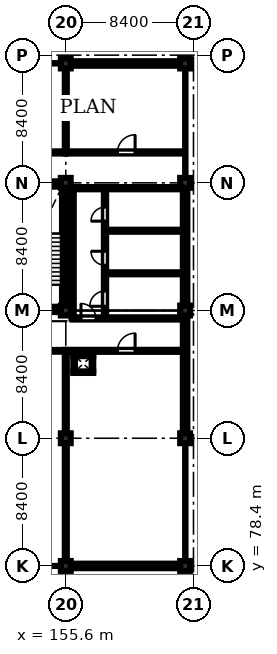
"""IFC4 building model, lengths in metres.
Left out: names, types, materials, properties, quantities, classifications, styles, units other than length and angle.
Written with IfcOpenShell. Run it as: python <this file> out.ifc"""

import sys

from ifc_helpers import new_model, si_unit, direction, frame, frame_2d, origin, origin_2d, place, context, subcontext, project, spatial, rectangle, extrude, element, fill, save


model = new_model("IFC4")
c1 = context("Model", 3, precision=1e-05, world=origin(), true_north=direction((0.0, 1.0)))
c2 = subcontext(c1, "Body", "Model", "MODEL_VIEW")
j1 = project(units=[si_unit("LENGTHUNIT", "METRE"), si_unit("PLANEANGLEUNIT", "RADIAN")], contexts=[c1])
p1 = place(None, origin())
s1 = spatial("IfcSite", under=j1, at=p1, CompositionType="ELEMENT")
p2 = place(p1, origin())
s2 = spatial("IfcBuilding", under=s1, at=p2, CompositionType="ELEMENT")
p3 = place(p2, frame((0.0, 0.0, 57.0)))
s3 = spatial("IfcBuildingStorey", under=s2, at=p3, CompositionType="ELEMENT", Elevation=57.0)
for number, where, z_axis, x_axis in (
    (1, (155.6, 78.4, 0.0), (0.0, 0.0, 1.0), (1.0, 0.0, 0.0)),
    (2, (155.6, 86.8, 0.0), (0.0, 0.0, 1.0), (1.0, 0.0, 0.0)),
    (3, (155.6, 95.2, 0.0), (0.0, 0.0, 1.0), (1.0, 0.0, 0.0)),
    (4, (155.6, 103.6, 0.0), (0.0, 0.0, 1.0), (1.0, 0.0, 0.0)),
    (5, (155.6, 111.45, 0.0), (0.0, 0.0, 1.0), (1.0, 0.0, 0.0)),
    (6, (163.45, 78.4, 0.0), (0.0, 0.0, 1.0), (1.0, 0.0, 0.0)),
    (7, (163.45, 86.8, 0.0), (0.0, 0.0, 1.0), (1.0, 0.0, 0.0)),
    (8, (163.45, 95.2, 0.0), (0.0, 0.0, 1.0), (1.0, 0.0, 0.0)),
    (9, (163.45, 103.6, 0.0), (0.0, 0.0, 1.0), (1.0, 0.0, 0.0)),
    (10, (163.45, 111.45, 0.0), (0.0, 0.0, 1.0), (1.0, 0.0, 0.0)),
):
    element("IfcColumn", number, at=place(p3, frame(where, z_axis=z_axis, x_axis=x_axis)), inside=s3, PredefinedType="COLUMN", context=c2, shape_type="SweptSolid", body=[
        extrude(rectangle(XDim=0.65, YDim=0.65, at=origin_2d()), origin(), (0.0, 0.0, 1.0), 4.02),
    ])
for number, where, z_axis, x_axis in (
    (11, (151.9, 95.275, 0.0), (0.0, 0.0, 1.0), (1.0, 0.0, 0.0)),
    (12, (151.9, 103.525, 0.0), (0.0, 0.0, 1.0), (1.0, 0.0, 0.0)),
):
    element("IfcWall", number, at=place(p3, frame(where, z_axis=z_axis, x_axis=x_axis)), inside=s3, PredefinedType="SHEAR", context=c2, shape_type="SweptSolid", body=[
        extrude(rectangle(XDim=3.8, YDim=0.35, at=frame_2d((1.9, 0.0))), origin(), (0.0, 0.0, 1.0), 4.02),
    ])
p4 = place(p3, frame((155.525, 95.45, 0.0), z_axis=(0.0, 0.0, 1.0), x_axis=(0.0, 1.0, 0.0)))
e13 = element("IfcWall", 13, at=p4, inside=s3, PredefinedType="SHEAR", context=c2, shape_type="SweptSolid", body=[
    extrude(rectangle(XDim=7.9, YDim=0.35, at=frame_2d((3.95, 0.0))), origin(), (0.0, 0.0, 1.0), 4.02),
])
p5 = place(p3, frame((155.925, 111.45, 0.0), z_axis=(0.0, 0.0, 1.0), x_axis=(1.0, 0.0, 0.0)))
e14 = element("IfcWall", 14, at=p5, inside=s3, PredefinedType="STANDARD", context=c2, shape_type="SweptSolid", body=[
    extrude(rectangle(XDim=7.2, YDim=0.3, at=frame_2d((3.6, 0.0))), origin(), (0.0, 0.0, 1.0), 3.32),
])
p6 = place(p5, frame((0.85, 0.0, 0.9)))
e15 = element("IfcOpeningElement", 15, at=p6, cuts=e14, PredefinedType="OPENING", context=c2, shape_type="SweptSolid", body=[
    extrude(rectangle(XDim=1.9, YDim=2.1, at=frame_2d((0.95, 1.05))), frame((0.0, 0.16, 0.0), z_axis=(0.0, -1.0, 0.0), x_axis=(1.0, 0.0, 0.0)), (0.0, 0.0, 1.0), 0.32),
])
p7 = place(p5, frame((4.65, 0.0, 0.9)))
e16 = element("IfcOpeningElement", 16, at=p7, cuts=e14, PredefinedType="OPENING", context=c2, shape_type="SweptSolid", body=[
    extrude(rectangle(XDim=1.9, YDim=2.1, at=frame_2d((0.95, 1.05))), frame((0.0, 0.16, 0.0), z_axis=(0.0, -1.0, 0.0), x_axis=(1.0, 0.0, 0.0)), (0.0, 0.0, 1.0), 0.32),
])
p8 = place(p3, frame((163.125, 78.4, 0.0), z_axis=(0.0, 0.0, 1.0), x_axis=(-1.0, 0.0, 0.0)))
e17 = element("IfcWall", 17, at=p8, inside=s3, PredefinedType="STANDARD", context=c2, shape_type="SweptSolid", body=[
    extrude(rectangle(XDim=7.2, YDim=0.3, at=frame_2d((3.6, 0.0))), origin(), (0.0, 0.0, 1.0), 3.32),
])
p9 = place(p8, frame((1.15, 0.0, 0.95)))
e18 = element("IfcOpeningElement", 18, at=p9, cuts=e17, PredefinedType="OPENING", context=c2, shape_type="SweptSolid", body=[
    extrude(rectangle(XDim=1.75, YDim=1.85, at=frame_2d((0.875, 0.925))), frame((0.0, 0.16, 0.0), z_axis=(0.0, -1.0, 0.0), x_axis=(1.0, 0.0, 0.0)), (0.0, 0.0, 1.0), 0.32),
])
p10 = place(p3, frame((163.45, 94.875, 0.0), z_axis=(0.0, 0.0, 1.0), x_axis=(0.0, -1.0, 0.0)))
e19 = element("IfcWall", 19, at=p10, inside=s3, PredefinedType="STANDARD", context=c2, shape_type="SweptSolid", body=[
    extrude(rectangle(XDim=7.75, YDim=0.3, at=frame_2d((3.875, 0.0))), origin(), (0.0, 0.0, 1.0), 3.32),
])
p11 = place(p10, frame((4.2, 0.0, 1.1)))
e20 = element("IfcOpeningElement", 20, at=p11, cuts=e19, PredefinedType="OPENING", context=c2, shape_type="SweptSolid", body=[
    extrude(rectangle(XDim=1.8, YDim=1.8, at=frame_2d((0.9, 0.9))), frame((0.0, 0.16, 0.0), z_axis=(0.0, -1.0, 0.0), x_axis=(1.0, 0.0, 0.0)), (0.0, 0.0, 1.0), 0.32),
])
p12 = place(p3, frame((163.45, 103.275, 0.0), z_axis=(0.0, 0.0, 1.0), x_axis=(0.0, -1.0, 0.0)))
e21 = element("IfcWall", 21, at=p12, inside=s3, PredefinedType="STANDARD", context=c2, shape_type="SweptSolid", body=[
    extrude(rectangle(XDim=7.75, YDim=0.3, at=frame_2d((3.875, 0.0))), origin(), (0.0, 0.0, 1.0), 3.32),
])
p13 = place(p12, frame((1.15, 0.0, 1.1)))
e22 = element("IfcOpeningElement", 22, at=p13, cuts=e21, PredefinedType="OPENING", context=c2, shape_type="SweptSolid", body=[
    extrude(rectangle(XDim=1.4, YDim=1.4, at=frame_2d((0.7, 0.7))), frame((0.0, 0.16, 0.0), z_axis=(0.0, -1.0, 0.0), x_axis=(1.0, 0.0, 0.0)), (0.0, 0.0, 1.0), 0.32),
])
p14 = place(p3, frame((156.05, 94.68, 0.0), z_axis=(0.0, 0.0, 1.0), x_axis=(1.0, 0.0, 0.0)))
e23 = element("IfcWall", 23, at=p14, inside=s3, PredefinedType="PARTITIONING", context=c2, shape_type="SweptSolid", body=[
    extrude(rectangle(XDim=7.15, YDim=0.15, at=frame_2d((3.575, 0.0))), origin(), (0.0, 0.0, 1.0), 4.02),
])
p15 = place(p14, frame((0.55, 0.0, 0.0)))
e24 = element("IfcOpeningElement", 24, at=p15, cuts=e23, PredefinedType="OPENING", context=c2, shape_type="SweptSolid", body=[
    extrude(rectangle(XDim=0.98, YDim=2.12, at=frame_2d((0.49, 1.06))), frame((0.0, 0.085, 0.0), z_axis=(0.0, -1.0, 0.0), x_axis=(1.0, 0.0, 0.0)), (0.0, 0.0, 1.0), 0.17),
])
p16 = place(p3, frame((158.18, 94.68, 0.0), z_axis=(0.0, 0.0, 1.0), x_axis=(0.0, 1.0, 0.0)))
e25 = element("IfcWall", 25, at=p16, inside=s3, PredefinedType="PARTITIONING", context=c2, shape_type="SweptSolid", body=[
    extrude(rectangle(XDim=8.57, YDim=0.15, at=frame_2d((4.285, 0.0))), origin(), (0.0, 0.0, 1.0), 4.02),
])
p17 = place(p16, frame((0.8, 0.0, 0.0)))
e26 = element("IfcOpeningElement", 26, at=p17, cuts=e25, PredefinedType="OPENING", context=c2, shape_type="SweptSolid", body=[
    extrude(rectangle(XDim=1.0, YDim=2.12, at=frame_2d((0.5, 1.06))), frame((0.0, 0.085, 0.0), z_axis=(0.0, -1.0, 0.0), x_axis=(1.0, 0.0, 0.0)), (0.0, 0.0, 1.0), 0.17),
])
p18 = place(p16, frame((3.5, 0.0, 0.0)))
e27 = element("IfcOpeningElement", 27, at=p18, cuts=e25, PredefinedType="OPENING", context=c2, shape_type="SweptSolid", body=[
    extrude(rectangle(XDim=0.92, YDim=2.1, at=frame_2d((0.46, 1.05))), frame((0.0, 0.085, 0.0), z_axis=(0.0, -1.0, 0.0), x_axis=(1.0, 0.0, 0.0)), (0.0, 0.0, 1.0), 0.17),
])
p19 = place(p16, frame((6.4, 0.0, 0.0)))
e28 = element("IfcOpeningElement", 28, at=p19, cuts=e25, PredefinedType="OPENING", context=c2, shape_type="SweptSolid", body=[
    extrude(rectangle(XDim=0.92, YDim=2.1, at=frame_2d((0.46, 1.05))), frame((0.0, 0.085, 0.0), z_axis=(0.0, -1.0, 0.0), x_axis=(1.0, 0.0, 0.0)), (0.0, 0.0, 1.0), 0.17),
])
for number, where, z_axis, x_axis in (
    (29, (158.18, 97.65, 0.0), (0.0, 0.0, 1.0), (1.0, 0.0, 0.0)),
    (30, (158.18, 100.45, 0.0), (0.0, 0.0, 1.0), (1.0, 0.0, 0.0)),
):
    element("IfcWall", number, at=place(p3, frame(where, z_axis=z_axis, x_axis=x_axis)), inside=s3, PredefinedType="PARTITIONING", context=c2, shape_type="SweptSolid", body=[
        extrude(rectangle(XDim=5.02, YDim=0.135, at=frame_2d((2.51, 0.0))), origin(), (0.0, 0.0, 1.0), 4.02),
    ])
p20 = place(p3, frame((156.05, 103.25, 0.0), z_axis=(0.0, 0.0, 1.0), x_axis=(1.0, 0.0, 0.0)))
e31 = element("IfcWall", 31, at=p20, inside=s3, PredefinedType="PARTITIONING", context=c2, shape_type="SweptSolid", body=[
    extrude(rectangle(XDim=7.15, YDim=0.15, at=frame_2d((3.575, 0.0))), origin(), (0.0, 0.0, 1.0), 4.02),
])
p21 = place(p3, frame((156.05, 94.68, 0.0), z_axis=(0.0, 0.0, 1.0), x_axis=(0.0, 1.0, 0.0)))
e32 = element("IfcWall", 32, at=p21, inside=s3, PredefinedType="PARTITIONING", context=c2, shape_type="SweptSolid", body=[
    extrude(rectangle(XDim=8.57, YDim=0.15, at=frame_2d((4.285, 0.0))), origin(), (0.0, 0.0, 1.0), 4.02),
])
p22 = place(p3, frame((147.2, 105.6, 0.0), z_axis=(0.0, 0.0, 1.0), x_axis=(1.0, 0.0, 0.0)))
e33 = element("IfcWall", 33, at=p22, inside=s3, PredefinedType="PARTITIONING", context=c2, shape_type="SweptSolid", body=[
    extrude(rectangle(XDim=8.4, YDim=0.145, at=frame_2d((4.2, 0.0))), origin(), (0.0, 0.0, 1.0), 4.02),
])
p23 = place(p22, frame((3.4, 0.0, 0.0)))
e34 = element("IfcOpeningElement", 34, at=p23, cuts=e33, PredefinedType="OPENING", context=c2, shape_type="SweptSolid", body=[
    extrude(rectangle(XDim=1.04, YDim=2.16, at=frame_2d((0.52, 1.08))), frame((0.0, 0.083, 0.0), z_axis=(0.0, -1.0, 0.0), x_axis=(1.0, 0.0, 0.0)), (0.0, 0.0, 1.0), 0.165),
])
p24 = place(p3, frame((155.6, 105.6, 0.0), z_axis=(0.0, 0.0, 1.0), x_axis=(1.0, 0.0, 0.0)))
e35 = element("IfcWall", 35, at=p24, inside=s3, PredefinedType="PARTITIONING", context=c2, shape_type="SweptSolid", body=[
    extrude(rectangle(XDim=7.75, YDim=0.145, at=frame_2d((3.875, 0.0))), origin(), (0.0, 0.0, 1.0), 4.02),
])
p25 = place(p24, frame((3.4, 0.0, 0.0)))
e36 = element("IfcOpeningElement", 36, at=p25, cuts=e35, PredefinedType="OPENING", context=c2, shape_type="SweptSolid", body=[
    extrude(rectangle(XDim=1.16, YDim=2.2, at=frame_2d((0.58, 1.1))), frame((0.0, 0.083, 0.0), z_axis=(0.0, -1.0, 0.0), x_axis=(1.0, 0.0, 0.0)), (0.0, 0.0, 1.0), 0.165),
])
p26 = place(p3, frame((155.6, 105.6, 0.0), z_axis=(0.0, 0.0, 1.0), x_axis=(0.0, 1.0, 0.0)))
e37 = element("IfcWall", 37, at=p26, inside=s3, PredefinedType="PARTITIONING", context=c2, shape_type="SweptSolid", body=[
    extrude(rectangle(XDim=5.75, YDim=0.135, at=frame_2d((2.875, 0.0))), origin(), (0.0, 0.0, 1.0), 3.32),
])
p27 = place(p3, frame((147.2, 92.55, 0.0), z_axis=(0.0, 0.0, 1.0), x_axis=(1.0, 0.0, 0.0)))
e38 = element("IfcWall", 38, at=p27, inside=s3, PredefinedType="PARTITIONING", context=c2, shape_type="SweptSolid", body=[
    extrude(rectangle(XDim=8.4, YDim=0.12, at=frame_2d((4.2, 0.0))), origin(), (0.0, 0.0, 1.0), 4.02),
])
p28 = place(p27, frame((3.4, 0.0, 0.0)))
e39 = element("IfcOpeningElement", 39, at=p28, cuts=e38, PredefinedType="OPENING", context=c2, shape_type="SweptSolid", body=[
    extrude(rectangle(XDim=1.16, YDim=2.2, at=frame_2d((0.58, 1.1))), frame((0.0, 0.07, 0.0), z_axis=(0.0, -1.0, 0.0), x_axis=(1.0, 0.0, 0.0)), (0.0, 0.0, 1.0), 0.14),
])
p29 = place(p3, frame((155.6, 92.55, 0.0), z_axis=(0.0, 0.0, 1.0), x_axis=(1.0, 0.0, 0.0)))
e40 = element("IfcWall", 40, at=p29, inside=s3, PredefinedType="PARTITIONING", context=c2, shape_type="SweptSolid", body=[
    extrude(rectangle(XDim=7.75, YDim=0.135, at=frame_2d((3.875, 0.0))), origin(), (0.0, 0.0, 1.0), 4.02),
])
p30 = place(p29, frame((3.4, 0.0, 0.0)))
e41 = element("IfcOpeningElement", 41, at=p30, cuts=e40, PredefinedType="OPENING", context=c2, shape_type="SweptSolid", body=[
    extrude(rectangle(XDim=1.16, YDim=2.2, at=frame_2d((0.58, 1.1))), frame((0.0, 0.077, 0.0), z_axis=(0.0, -1.0, 0.0), x_axis=(1.0, 0.0, 0.0)), (0.0, 0.0, 1.0), 0.155),
])
p31 = place(p3, frame((155.6, 78.55, 0.0), z_axis=(0.0, 0.0, 1.0), x_axis=(0.0, 1.0, 0.0)))
e42 = element("IfcWall", 42, at=p31, inside=s3, PredefinedType="PARTITIONING", context=c2, shape_type="SweptSolid", body=[
    extrude(rectangle(XDim=14.0, YDim=0.135, at=frame_2d((7.0, 0.0))), origin(), (0.0, 0.0, 1.0), 3.32),
])
for number, where, z_axis, x_axis in (
    (43, (156.095, 91.147, 0.0), (0.0, 0.0, 1.0), (1.0, 0.0, 0.0)),
    (44, (156.095, 92.252, 0.0), (0.0, 0.0, 1.0), (1.0, 0.0, 0.0)),
):
    element("IfcWall", number, at=place(p3, frame(where, z_axis=z_axis, x_axis=x_axis)), inside=s3, PredefinedType="PARTITIONING", context=c2, shape_type="SweptSolid", body=[
        extrude(rectangle(XDim=1.31, YDim=0.105, at=frame_2d((0.655, 0.0))), origin(), (0.0, 0.0, 1.0), 4.02),
    ])
for number, where, z_axis, x_axis in (
    (45, (156.147, 91.2, 0.0), (0.0, 0.0, 1.0), (0.0, 1.0, 0.0)),
    (46, (157.353, 91.2, 0.0), (0.0, 0.0, 1.0), (0.0, 1.0, 0.0)),
):
    element("IfcWall", number, at=place(p3, frame(where, z_axis=z_axis, x_axis=x_axis)), inside=s3, PredefinedType="PARTITIONING", context=c2, shape_type="SweptSolid", body=[
        extrude(rectangle(XDim=1.0, YDim=0.105, at=frame_2d((0.5, 0.0))), origin(), (0.0, 0.0, 1.0), 4.02),
    ])
p32 = place(p6, origin())
e47 = element("IfcWindow", 47, at=p32, inside=s3, PartitioningType="DOUBLE_PANEL_VERTICAL", PredefinedType="WINDOW", context=c2, shape_type="SweptSolid", body=[
    extrude(rectangle(XDim=1.9, YDim=2.1, at=frame_2d((0.95, 1.05))), frame((0.0, 0.03, 0.0), z_axis=(0.0, -1.0, 0.0), x_axis=(1.0, 0.0, 0.0)), (0.0, 0.0, 1.0), 0.06),
])
fill(e15, e47)
p33 = place(p7, origin())
e48 = element("IfcWindow", 48, at=p33, inside=s3, PartitioningType="DOUBLE_PANEL_VERTICAL", PredefinedType="WINDOW", context=c2, shape_type="SweptSolid", body=[
    extrude(rectangle(XDim=1.9, YDim=2.1, at=frame_2d((0.95, 1.05))), frame((0.0, 0.03, 0.0), z_axis=(0.0, -1.0, 0.0), x_axis=(1.0, 0.0, 0.0)), (0.0, 0.0, 1.0), 0.06),
])
fill(e16, e48)
p34 = place(p9, origin())
e49 = element("IfcWindow", 49, at=p34, inside=s3, PartitioningType="DOUBLE_PANEL_VERTICAL", PredefinedType="WINDOW", context=c2, shape_type="SweptSolid", body=[
    extrude(rectangle(XDim=1.75, YDim=1.85, at=frame_2d((0.875, 0.925))), frame((0.0, 0.03, 0.0), z_axis=(0.0, -1.0, 0.0), x_axis=(1.0, 0.0, 0.0)), (0.0, 0.0, 1.0), 0.06),
])
fill(e18, e49)
p35 = place(p11, origin())
e50 = element("IfcWindow", 50, at=p35, inside=s3, PartitioningType="DOUBLE_PANEL_VERTICAL", PredefinedType="WINDOW", context=c2, shape_type="SweptSolid", body=[
    extrude(rectangle(XDim=1.8, YDim=1.8, at=frame_2d((0.9, 0.9))), frame((0.0, 0.03, 0.0), z_axis=(0.0, -1.0, 0.0), x_axis=(1.0, 0.0, 0.0)), (0.0, 0.0, 1.0), 0.06),
])
fill(e20, e50)
p36 = place(p13, origin())
e51 = element("IfcWindow", 51, at=p36, inside=s3, PartitioningType="SINGLE_PANEL", PredefinedType="WINDOW", context=c2, shape_type="SweptSolid", body=[
    extrude(rectangle(XDim=1.4, YDim=1.4, at=frame_2d((0.7, 0.7))), frame((0.0, 0.03, 0.0), z_axis=(0.0, -1.0, 0.0), x_axis=(1.0, 0.0, 0.0)), (0.0, 0.0, 1.0), 0.06),
])
fill(e22, e51)
p37 = place(p15, origin())
e52 = element("IfcDoor", 52, at=p37, inside=s3, OperationType="SINGLE_SWING_LEFT", PredefinedType="DOOR", context=c2, shape_type="SweptSolid", body=[
    extrude(rectangle(XDim=0.98, YDim=2.12, at=frame_2d((0.49, 1.06))), frame((0.0, 0.025, 0.0), z_axis=(0.0, -1.0, 0.0), x_axis=(1.0, 0.0, 0.0)), (0.0, 0.0, 1.0), 0.05),
])
fill(e24, e52)
p38 = place(p17, origin())
e53 = element("IfcDoor", 53, at=p38, inside=s3, OperationType="SINGLE_SWING_LEFT", PredefinedType="DOOR", context=c2, shape_type="SweptSolid", body=[
    extrude(rectangle(XDim=1.0, YDim=2.12, at=frame_2d((0.5, 1.06))), frame((0.0, 0.025, 0.0), z_axis=(0.0, -1.0, 0.0), x_axis=(1.0, 0.0, 0.0)), (0.0, 0.0, 1.0), 0.05),
])
fill(e26, e53)
p39 = place(p18, origin())
e54 = element("IfcDoor", 54, at=p39, inside=s3, OperationType="SINGLE_SWING_RIGHT", PredefinedType="DOOR", context=c2, shape_type="SweptSolid", body=[
    extrude(rectangle(XDim=0.92, YDim=2.1, at=frame_2d((0.46, 1.05))), frame((0.0, 0.025, 0.0), z_axis=(0.0, -1.0, 0.0), x_axis=(1.0, 0.0, 0.0)), (0.0, 0.0, 1.0), 0.05),
])
fill(e27, e54)
p40 = place(p19, origin())
e55 = element("IfcDoor", 55, at=p40, inside=s3, OperationType="SINGLE_SWING_LEFT", PredefinedType="DOOR", context=c2, shape_type="SweptSolid", body=[
    extrude(rectangle(XDim=0.92, YDim=2.1, at=frame_2d((0.46, 1.05))), frame((0.0, 0.025, 0.0), z_axis=(0.0, -1.0, 0.0), x_axis=(1.0, 0.0, 0.0)), (0.0, 0.0, 1.0), 0.05),
])
fill(e28, e55)
p41 = place(p25, origin())
e56 = element("IfcDoor", 56, at=p41, inside=s3, OperationType="SINGLE_SWING_RIGHT", PredefinedType="DOOR", context=c2, shape_type="SweptSolid", body=[
    extrude(rectangle(XDim=1.16, YDim=2.2, at=frame_2d((0.58, 1.1))), frame((0.0, 0.025, 0.0), z_axis=(0.0, -1.0, 0.0), x_axis=(1.0, 0.0, 0.0)), (0.0, 0.0, 1.0), 0.05),
])
fill(e36, e56)
p42 = place(p30, origin())
e57 = element("IfcDoor", 57, at=p42, inside=s3, OperationType="SINGLE_SWING_RIGHT", PredefinedType="DOOR", context=c2, shape_type="SweptSolid", body=[
    extrude(rectangle(XDim=1.16, YDim=2.2, at=frame_2d((0.58, 1.1))), frame((0.0, 0.025, 0.0), z_axis=(0.0, -1.0, 0.0), x_axis=(1.0, 0.0, 0.0)), (0.0, 0.0, 1.0), 0.05),
])
fill(e41, e57)
save(model, sys.argv[1])
